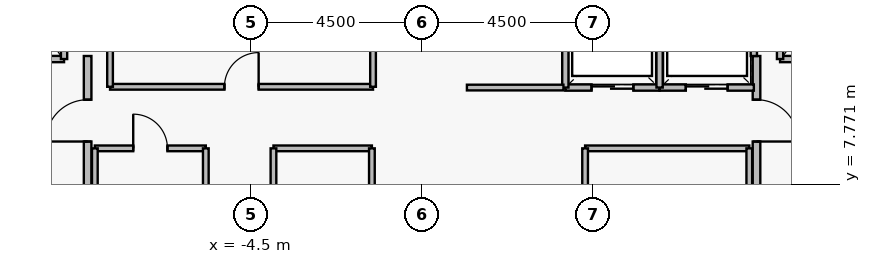
"""IFC4 building model, lengths in metres.
Left out: names, types, materials, properties, quantities, classifications, styles, units other than length and angle.
Written with IfcOpenShell. Run it as: python <this file> out.ifc"""

import sys

from ifc_helpers import new_model, si_unit, direction, frame, frame_2d, origin, place, context, subcontext, project, spatial, rectangle, extrude, element, fill, save


model = new_model("IFC4")
c1 = context("Model", 3, precision=1e-05, world=origin(), true_north=direction((0.0, 1.0)))
c2 = subcontext(c1, "Body", "Model", "MODEL_VIEW")
j1 = project(units=[si_unit("LENGTHUNIT", "METRE"), si_unit("PLANEANGLEUNIT", "RADIAN")], contexts=[c1])
p1 = place(None, origin())
s1 = spatial("IfcSite", under=j1, at=p1, CompositionType="ELEMENT")
p2 = place(p1, origin())
s2 = spatial("IfcBuilding", under=s1, at=p2, CompositionType="ELEMENT")
p3 = place(p2, frame((0.0, 0.0, 243.35)))
s3 = spatial("IfcBuildingStorey", under=s2, at=p3, CompositionType="ELEMENT", Elevation=243.35)
p4 = place(p3, frame((-8.8, 5.05, 0.0), z_axis=(0.0, 0.0, 1.0), x_axis=(0.0, 1.0, 0.0)))
e1 = element("IfcWall", 1, at=p4, inside=s3, PredefinedType="PARTITIONING", context=c2, shape_type="SweptSolid", body=[
    extrude(rectangle(XDim=6.1, YDim=0.2, at=frame_2d((3.05, 0.0))), origin(), (0.0, 0.0, 1.0), 3.48),
])
p5 = place(p4, frame((0.25, 0.0, 0.0)))
e2 = element("IfcOpeningElement", 2, at=p5, cuts=e1, PredefinedType="OPENING", context=c2, shape_type="SweptSolid", body=[
    extrude(rectangle(XDim=1.1, YDim=2.2, at=frame_2d((0.55, 1.1))), frame((0.0, 0.11, 0.0), z_axis=(0.0, -1.0, 0.0), x_axis=(1.0, 0.0, 0.0)), (0.0, 0.0, 1.0), 0.22),
])
p6 = place(p4, frame((3.85, 0.0, 0.0)))
e3 = element("IfcOpeningElement", 3, at=p6, cuts=e1, PredefinedType="OPENING", context=c2, shape_type="SweptSolid", body=[
    extrude(rectangle(XDim=1.1, YDim=2.2, at=frame_2d((0.55, 1.1))), frame((0.0, 0.11, 0.0), z_axis=(0.0, -1.0, 0.0), x_axis=(1.0, 0.0, 0.0)), (0.0, 0.0, 1.0), 0.22),
])
p7 = place(p3, frame((8.8, 11.15, 0.0), z_axis=(0.0, 0.0, 1.0), x_axis=(0.0, -1.0, 0.0)))
e4 = element("IfcWall", 4, at=p7, inside=s3, PredefinedType="PARTITIONING", context=c2, shape_type="SweptSolid", body=[
    extrude(rectangle(XDim=6.1, YDim=0.2, at=frame_2d((3.05, 0.0))), origin(), (0.0, 0.0, 1.0), 3.48),
])
p8 = place(p7, frame((1.15, 0.0, 0.0)))
e5 = element("IfcOpeningElement", 5, at=p8, cuts=e4, PredefinedType="OPENING", context=c2, shape_type="SweptSolid", body=[
    extrude(rectangle(XDim=1.1, YDim=2.2, at=frame_2d((0.55, 1.1))), frame((0.0, 0.11, 0.0), z_axis=(0.0, -1.0, 0.0), x_axis=(1.0, 0.0, 0.0)), (0.0, 0.0, 1.0), 0.22),
])
p9 = place(p7, frame((4.75, 0.0, 0.0)))
e6 = element("IfcOpeningElement", 6, at=p9, cuts=e4, PredefinedType="OPENING", context=c2, shape_type="SweptSolid", body=[
    extrude(rectangle(XDim=1.1, YDim=2.2, at=frame_2d((0.55, 1.1))), frame((0.0, 0.11, 0.0), z_axis=(0.0, -1.0, 0.0), x_axis=(1.0, 0.0, 0.0)), (0.0, 0.0, 1.0), 0.22),
])
p10 = place(p3, frame((-11.58, 11.07, 0.0), z_axis=(0.0, 0.0, 1.0), x_axis=(1.0, 0.0, 0.0)))
e7 = element("IfcWall", 7, at=p10, inside=s3, PredefinedType="PARTITIONING", context=c2, shape_type="SweptSolid", body=[
    extrude(rectangle(XDim=2.16, YDim=0.165, at=frame_2d((1.08, 0.0))), origin(), (0.0, 0.0, 1.0), 3.48),
])
p11 = place(p10, frame((0.53, 0.0, 0.0)))
e8 = element("IfcOpeningElement", 8, at=p11, cuts=e7, PredefinedType="OPENING", context=c2, shape_type="SweptSolid", body=[
    extrude(rectangle(XDim=1.15, YDim=2.25, at=frame_2d((0.575, 1.125))), frame((0.0, 0.093, 0.0), z_axis=(0.0, -1.0, 0.0), x_axis=(1.0, 0.0, 0.0)), (0.0, 0.0, 1.0), 0.185),
])
p12 = place(p3, frame((9.42, 11.07, 0.0), z_axis=(0.0, 0.0, 1.0), x_axis=(1.0, 0.0, 0.0)))
e9 = element("IfcWall", 9, at=p12, inside=s3, PredefinedType="PARTITIONING", context=c2, shape_type="SweptSolid", body=[
    extrude(rectangle(XDim=2.16, YDim=0.165, at=frame_2d((1.08, 0.0))), origin(), (0.0, 0.0, 1.0), 3.48),
])
p13 = place(p12, frame((0.53, 0.0, 0.0)))
e10 = element("IfcOpeningElement", 10, at=p13, cuts=e9, PredefinedType="OPENING", context=c2, shape_type="SweptSolid", body=[
    extrude(rectangle(XDim=1.15, YDim=2.25, at=frame_2d((0.575, 1.125))), frame((0.0, 0.093, 0.0), z_axis=(0.0, -1.0, 0.0), x_axis=(1.0, 0.0, 0.0)), (0.0, 0.0, 1.0), 0.185),
])
p14 = place(p3, frame((3.77, 10.32, 0.0), z_axis=(0.0, 0.0, 1.0), x_axis=(1.0, 0.0, 0.0)))
e11 = element("IfcWall", 11, at=p14, inside=s3, PredefinedType="PARTITIONING", context=c2, shape_type="SweptSolid", body=[
    extrude(rectangle(XDim=2.48, YDim=0.165, at=frame_2d((1.24, 0.0))), origin(), (0.0, 0.0, 1.0), 3.48),
])
p15 = place(p14, frame((0.69, 0.0, 0.0)))
e12 = element("IfcOpeningElement", 12, at=p15, cuts=e11, PredefinedType="OPENING", context=c2, shape_type="SweptSolid", body=[
    extrude(rectangle(XDim=1.1, YDim=2.25, at=frame_2d((0.55, 1.125))), frame((0.0, 0.093, 0.0), z_axis=(0.0, -1.0, 0.0), x_axis=(1.0, 0.0, 0.0)), (0.0, 0.0, 1.0), 0.185),
])
p16 = place(p3, frame((6.25, 10.32, 0.0), z_axis=(0.0, 0.0, 1.0), x_axis=(1.0, 0.0, 0.0)))
e13 = element("IfcWall", 13, at=p16, inside=s3, PredefinedType="PARTITIONING", context=c2, shape_type="SweptSolid", body=[
    extrude(rectangle(XDim=2.48, YDim=0.165, at=frame_2d((1.24, 0.0))), origin(), (0.0, 0.0, 1.0), 3.48),
])
p17 = place(p16, frame((0.69, 0.0, 0.0)))
e14 = element("IfcOpeningElement", 14, at=p17, cuts=e13, PredefinedType="OPENING", context=c2, shape_type="SweptSolid", body=[
    extrude(rectangle(XDim=1.1, YDim=2.25, at=frame_2d((0.55, 1.125))), frame((0.0, 0.093, 0.0), z_axis=(0.0, -1.0, 0.0), x_axis=(1.0, 0.0, 0.0)), (0.0, 0.0, 1.0), 0.185),
])
p18 = place(p3, frame((-8.21, 10.34, 0.0), z_axis=(0.0, 0.0, 1.0), x_axis=(1.0, 0.0, 0.0)))
e15 = element("IfcWall", 15, at=p18, inside=s3, PredefinedType="PARTITIONING", context=c2, shape_type="SweptSolid", body=[
    extrude(rectangle(XDim=6.92, YDim=0.15, at=frame_2d((3.46, 0.0))), origin(), (0.0, 0.0, 1.0), 3.48),
])
p19 = place(p18, frame((3.01, 0.0, 0.0)))
e16 = element("IfcOpeningElement", 16, at=p19, cuts=e15, PredefinedType="OPENING", context=c2, shape_type="SweptSolid", body=[
    extrude(rectangle(XDim=0.9, YDim=2.15, at=frame_2d((0.45, 1.075))), frame((0.0, 0.085, 0.0), z_axis=(0.0, -1.0, 0.0), x_axis=(1.0, 0.0, 0.0)), (0.0, 0.0, 1.0), 0.17),
])
p20 = place(p3, frame((-8.61, 8.72, 0.0), z_axis=(0.0, 0.0, 1.0), x_axis=(1.0, 0.0, 0.0)))
e17 = element("IfcWall", 17, at=p20, inside=s3, PredefinedType="PARTITIONING", context=c2, shape_type="SweptSolid", body=[
    extrude(rectangle(XDim=2.92, YDim=0.15, at=frame_2d((1.46, 0.0))), origin(), (0.0, 0.0, 1.0), 3.48),
])
p21 = place(p20, frame((1.01, 0.0, 0.0)))
e18 = element("IfcOpeningElement", 18, at=p21, cuts=e17, PredefinedType="OPENING", context=c2, shape_type="SweptSolid", body=[
    extrude(rectangle(XDim=0.9, YDim=2.15, at=frame_2d((0.45, 1.075))), frame((0.0, 0.085, 0.0), z_axis=(0.0, -1.0, 0.0), x_axis=(1.0, 0.0, 0.0)), (0.0, 0.0, 1.0), 0.17),
])
for number, where, z_axis, x_axis in (
    (19, (-9.42, 11.07, 0.0), (0.0, 0.0, 1.0), (0.0, 1.0, 0.0)),
    (20, (9.42, 11.07, 0.0), (0.0, 0.0, 1.0), (0.0, 1.0, 0.0)),
):
    element("IfcWall", number, at=place(p3, frame(where, z_axis=z_axis, x_axis=x_axis)), inside=s3, PredefinedType="PARTITIONING", context=c2, shape_type="SweptSolid", body=[
        extrude(rectangle(XDim=2.96, YDim=0.165, at=frame_2d((1.48, 0.0))), origin(), (0.0, 0.0, 1.0), 3.48),
    ])
for number, where, z_axis, x_axis in (
    (21, (3.77, 10.32, 0.0), (0.0, 0.0, 1.0), (0.0, 1.0, 0.0)),
    (22, (6.25, 10.32, 0.0), (0.0, 0.0, 1.0), (0.0, 1.0, 0.0)),
):
    element("IfcWall", number, at=place(p3, frame(where, z_axis=z_axis, x_axis=x_axis)), inside=s3, PredefinedType="PARTITIONING", context=c2, shape_type="SweptSolid", body=[
        extrude(rectangle(XDim=2.36, YDim=0.165, at=frame_2d((1.18, 0.0))), origin(), (0.0, 0.0, 1.0), 3.48),
    ])
p22 = place(p3, frame((8.73, 11.15, 0.0), z_axis=(0.0, 0.0, 1.0), x_axis=(0.0, 1.0, 0.0)))
e23 = element("IfcWall", 23, at=p22, inside=s3, PredefinedType="PARTITIONING", context=c2, shape_type="SweptSolid", body=[
    extrude(rectangle(XDim=1.53, YDim=0.165, at=frame_2d((0.765, 0.0))), origin(), (0.0, 0.0, 1.0), 3.48),
])
for number, where, z_axis, x_axis in (
    (24, (-8.21, 10.34, 0.0), (0.0, 0.0, 1.0), (0.0, 1.0, 0.0)),
    (25, (-1.29, 10.34, 0.0), (0.0, 0.0, 1.0), (0.0, 1.0, 0.0)),
):
    element("IfcWall", number, at=place(p3, frame(where, z_axis=z_axis, x_axis=x_axis)), inside=s3, PredefinedType="PARTITIONING", context=c2, shape_type="SweptSolid", body=[
        extrude(rectangle(XDim=2.52, YDim=0.15, at=frame_2d((1.26, 0.0))), origin(), (0.0, 0.0, 1.0), 3.48),
    ])
for number, where, z_axis, x_axis in (
    (26, (-8.61, 6.48, 0.0), (0.0, 0.0, 1.0), (0.0, 1.0, 0.0)),
    (27, (-5.69, 6.48, 0.0), (0.0, 0.0, 1.0), (0.0, 1.0, 0.0)),
):
    element("IfcWall", number, at=place(p3, frame(where, z_axis=z_axis, x_axis=x_axis)), inside=s3, PredefinedType="PARTITIONING", context=c2, shape_type="SweptSolid", body=[
        extrude(rectangle(XDim=2.24, YDim=0.15, at=frame_2d((1.12, 0.0))), origin(), (0.0, 0.0, 1.0), 3.48),
    ])
p23 = place(p3, frame((-3.91, 8.72, 0.0), z_axis=(0.0, 0.0, 1.0), x_axis=(1.0, 0.0, 0.0)))
e28 = element("IfcWall", 28, at=p23, inside=s3, PredefinedType="PARTITIONING", context=c2, shape_type="SweptSolid", body=[
    extrude(rectangle(XDim=2.59, YDim=0.15, at=frame_2d((1.295, 0.0))), origin(), (0.0, 0.0, 1.0), 3.48),
])
for number, where, z_axis, x_axis in (
    (29, (-3.91, 6.48, 0.0), (0.0, 0.0, 1.0), (0.0, 1.0, 0.0)),
    (30, (-1.32, 6.48, 0.0), (0.0, 0.0, 1.0), (0.0, 1.0, 0.0)),
):
    element("IfcWall", number, at=place(p3, frame(where, z_axis=z_axis, x_axis=x_axis)), inside=s3, PredefinedType="PARTITIONING", context=c2, shape_type="SweptSolid", body=[
        extrude(rectangle(XDim=2.24, YDim=0.15, at=frame_2d((1.12, 0.0))), origin(), (0.0, 0.0, 1.0), 3.48),
    ])
p24 = place(p3, frame((4.29, 8.72, 0.0), z_axis=(0.0, 0.0, 1.0), x_axis=(1.0, 0.0, 0.0)))
e31 = element("IfcWall", 31, at=p24, inside=s3, PredefinedType="PARTITIONING", context=c2, shape_type="SweptSolid", body=[
    extrude(rectangle(XDim=4.32, YDim=0.15, at=frame_2d((2.16, 0.0))), origin(), (0.0, 0.0, 1.0), 3.48),
])
for number, where, z_axis, x_axis in (
    (32, (4.29, 6.48, 0.0), (0.0, 0.0, 1.0), (0.0, 1.0, 0.0)),
    (33, (8.61, 6.48, 0.0), (0.0, 0.0, 1.0), (0.0, 1.0, 0.0)),
):
    element("IfcWall", number, at=place(p3, frame(where, z_axis=z_axis, x_axis=x_axis)), inside=s3, PredefinedType="PARTITIONING", context=c2, shape_type="SweptSolid", body=[
        extrude(rectangle(XDim=2.24, YDim=0.15, at=frame_2d((1.12, 0.0))), origin(), (0.0, 0.0, 1.0), 3.48),
    ])
p25 = place(p3, frame((1.18, 10.32, 0.0), z_axis=(0.0, 0.0, 1.0), x_axis=(1.0, 0.0, 0.0)))
e34 = element("IfcWall", 34, at=p25, inside=s3, PredefinedType="PARTITIONING", context=c2, shape_type="SweptSolid", body=[
    extrude(rectangle(XDim=2.54, YDim=0.15, at=frame_2d((1.27, 0.0))), origin(), (0.0, 0.0, 1.0), 3.48),
])
p26 = place(p6, origin())
e35 = element("IfcDoor", 35, at=p26, inside=s3, OperationType="SINGLE_SWING_LEFT", PredefinedType="DOOR", context=c2, shape_type="SweptSolid", body=[
    extrude(rectangle(XDim=1.1, YDim=2.2, at=frame_2d((0.55, 1.1))), frame((0.0, 0.025, 0.0), z_axis=(0.0, -1.0, 0.0), x_axis=(1.0, 0.0, 0.0)), (0.0, 0.0, 1.0), 0.05),
])
fill(e3, e35)
p27 = place(p8, origin())
e36 = element("IfcDoor", 36, at=p27, inside=s3, OperationType="SINGLE_SWING_RIGHT", PredefinedType="DOOR", context=c2, shape_type="SweptSolid", body=[
    extrude(rectangle(XDim=1.1, YDim=2.2, at=frame_2d((0.55, 1.1))), frame((0.0, 0.025, 0.0), z_axis=(0.0, -1.0, 0.0), x_axis=(1.0, 0.0, 0.0)), (0.0, 0.0, 1.0), 0.05),
])
fill(e5, e36)
p28 = place(p15, origin())
e37 = element("IfcDoor", 37, at=p28, inside=s3, OperationType="SLIDING_TO_LEFT", PredefinedType="DOOR", context=c2, shape_type="SweptSolid", body=[
    extrude(rectangle(XDim=1.1, YDim=2.25, at=frame_2d((0.55, 1.125))), frame((0.0, 0.025, 0.0), z_axis=(0.0, -1.0, 0.0), x_axis=(1.0, 0.0, 0.0)), (0.0, 0.0, 1.0), 0.05),
])
fill(e12, e37)
p29 = place(p17, origin())
e38 = element("IfcDoor", 38, at=p29, inside=s3, OperationType="SLIDING_TO_LEFT", PredefinedType="DOOR", context=c2, shape_type="SweptSolid", body=[
    extrude(rectangle(XDim=1.1, YDim=2.25, at=frame_2d((0.55, 1.125))), frame((0.0, 0.025, 0.0), z_axis=(0.0, -1.0, 0.0), x_axis=(1.0, 0.0, 0.0)), (0.0, 0.0, 1.0), 0.05),
])
fill(e14, e38)
p30 = place(p19, origin())
e39 = element("IfcDoor", 39, at=p30, inside=s3, OperationType="SINGLE_SWING_RIGHT", PredefinedType="DOOR", context=c2, shape_type="SweptSolid", body=[
    extrude(rectangle(XDim=0.9, YDim=2.15, at=frame_2d((0.45, 1.075))), frame((0.0, 0.025, 0.0), z_axis=(0.0, -1.0, 0.0), x_axis=(1.0, 0.0, 0.0)), (0.0, 0.0, 1.0), 0.05),
])
fill(e16, e39)
p31 = place(p21, origin())
e40 = element("IfcDoor", 40, at=p31, inside=s3, OperationType="SINGLE_SWING_LEFT", PredefinedType="DOOR", context=c2, shape_type="SweptSolid", body=[
    extrude(rectangle(XDim=0.9, YDim=2.15, at=frame_2d((0.45, 1.075))), frame((0.0, 0.025, 0.0), z_axis=(0.0, -1.0, 0.0), x_axis=(1.0, 0.0, 0.0)), (0.0, 0.0, 1.0), 0.05),
])
fill(e18, e40)
save(model, sys.argv[1])
